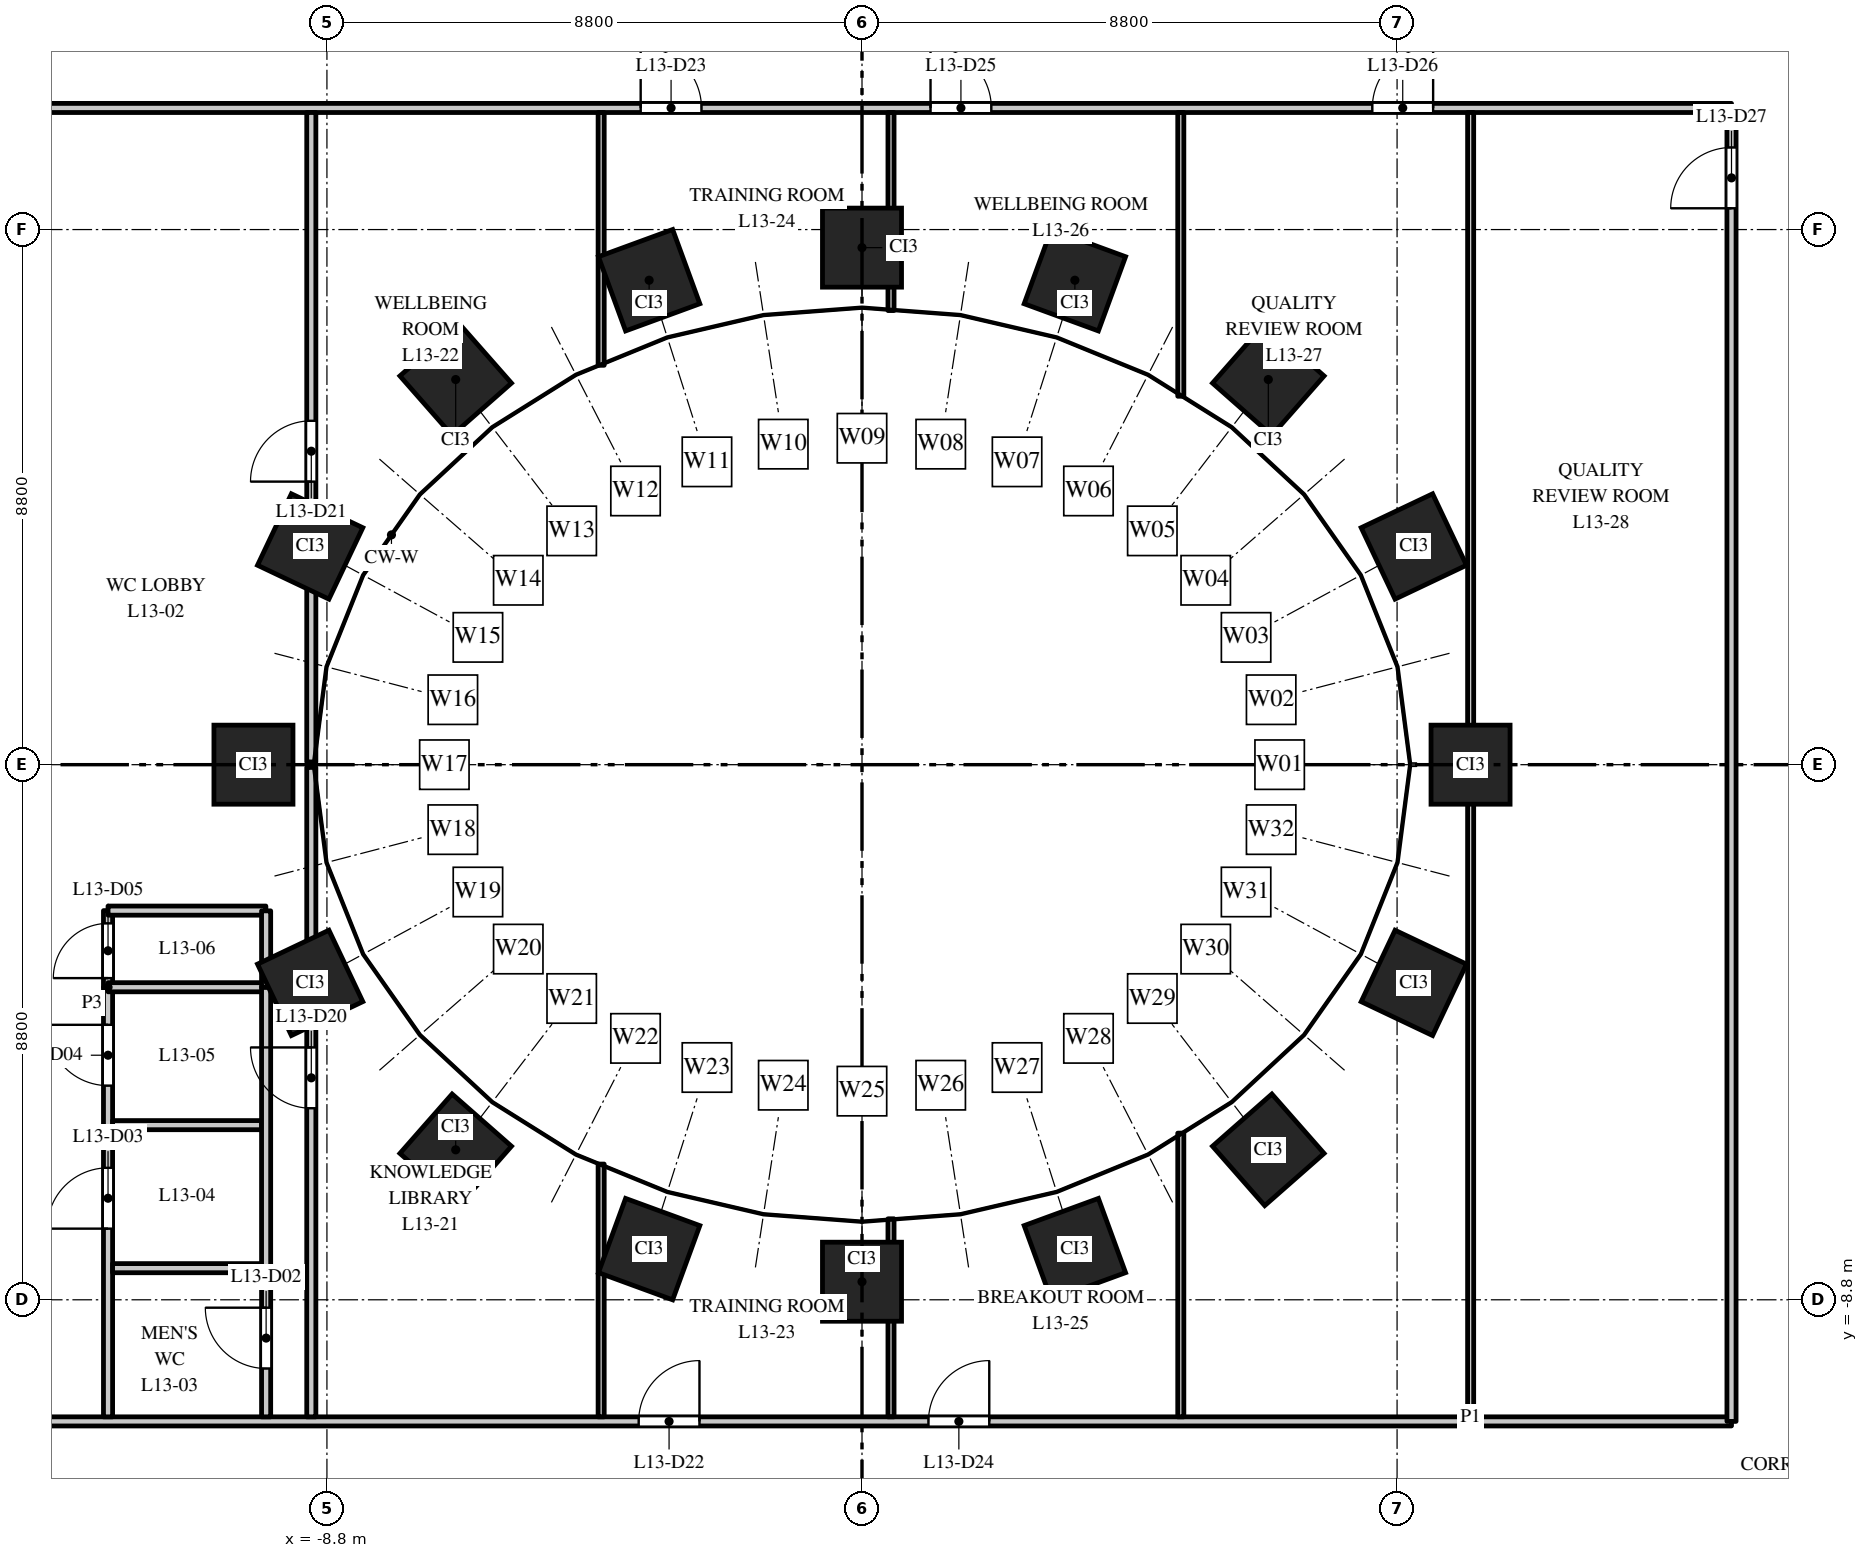
"""IFC4 building model, lengths in metres.
Left out: names, types, materials, properties, quantities, classifications, styles, units other than length and angle.
Written with IfcOpenShell. Run it as: python <this file> out.ifc"""

import sys

from ifc_helpers import new_model, si_unit, direction, frame, frame_2d, origin, origin_2d, place, context, subcontext, project, spatial, rectangle, extrude, element, fill, save


model = new_model("IFC4")
c1 = context("Model", 3, precision=1e-05, world=origin(), true_north=direction((0.0, 1.0)))
c2 = subcontext(c1, "Body", "Model", "MODEL_VIEW")
j1 = project(units=[si_unit("LENGTHUNIT", "METRE"), si_unit("PLANEANGLEUNIT", "RADIAN")], contexts=[c1])
p1 = place(None, origin())
s1 = spatial("IfcSite", under=j1, at=p1, CompositionType="ELEMENT")
p2 = place(p1, origin())
s2 = spatial("IfcBuilding", under=s1, at=p2, CompositionType="ELEMENT")
p3 = place(p2, frame((0.0, 0.0, 62.5)))
s3 = spatial("IfcBuildingStorey", under=s2, at=p3, CompositionType="ELEMENT", Elevation=62.5)
for number, where, z_axis, x_axis in (
    (1, (10.008, 0.0, 0.0), (0.0, 0.0, 1.0), (0.0, 1.0, 0.0)),
    (2, (9.076, 3.588, 0.0), (0.0, 0.0, 1.0), (-0.429, 0.903, 0.0)),
    (3, (6.682, 6.334, 0.0), (0.0, 0.0, 1.0), (-0.751, 0.66, 0.0)),
    (4, (3.501, 7.967, 0.0), (0.0, 0.0, 1.0), (-0.939, 0.344, 0.0)),
    (5, (0.0, 8.503, 0.0), (0.0, 0.0, 1.0), (-1.0, 0.0, 0.0)),
    (6, (-3.501, 7.967, 0.0), (0.0, 0.0, 1.0), (-0.939, -0.344, 0.0)),
    (7, (-6.682, 6.334, 0.0), (0.0, 0.0, 1.0), (-0.751, -0.66, 0.0)),
    (8, (-9.076, 3.588, 0.0), (0.0, 0.0, 1.0), (-0.429, -0.903, 0.0)),
    (9, (-10.008, 0.0, 0.0), (0.0, 0.0, 1.0), (0.0, -1.0, 0.0)),
    (10, (-9.076, -3.588, 0.0), (0.0, 0.0, 1.0), (0.429, -0.903, 0.0)),
    (11, (-6.682, -6.334, 0.0), (0.0, 0.0, 1.0), (0.751, -0.66, 0.0)),
    (12, (-3.501, -7.967, 0.0), (0.0, 0.0, 1.0), (0.939, -0.344, 0.0)),
    (13, (0.0, -8.503, 0.0), (0.0, 0.0, 1.0), (1.0, 0.0, 0.0)),
    (14, (3.501, -7.967, 0.0), (0.0, 0.0, 1.0), (0.939, 0.344, 0.0)),
    (15, (6.682, -6.334, 0.0), (0.0, 0.0, 1.0), (0.751, 0.66, 0.0)),
    (16, (9.076, -3.588, 0.0), (0.0, 0.0, 1.0), (0.429, 0.903, 0.0)),
):
    element("IfcColumn", number, at=place(p3, frame(where, z_axis=z_axis, x_axis=x_axis)), inside=s3, PredefinedType="COLUMN", context=c2, shape_type="SweptSolid", body=[
        extrude(rectangle(XDim=1.3, YDim=1.3, at=origin_2d()), origin(), (0.0, 0.0, 1.0), 4.0),
    ])
p4 = place(p3, frame((-14.3, -10.8, 0.0), z_axis=(0.0, 0.0, 1.0), x_axis=(1.0, 0.0, 0.0)))
e17 = element("IfcWall", 17, at=p4, inside=s3, PredefinedType="PARTITIONING", context=c2, shape_type="SweptSolid", body=[
    extrude(rectangle(XDim=28.6, YDim=0.15, at=frame_2d((14.3, 0.0))), origin(), (0.0, 0.0, 1.0), 2.85),
])
p5 = place(p4, frame((10.627, 0.0, 0.0)))
e18 = element("IfcOpeningElement", 18, at=p5, cuts=e17, PredefinedType="OPENING", context=c2, shape_type="SweptSolid", body=[
    extrude(rectangle(XDim=1.0, YDim=2.1, at=frame_2d((0.5, 1.05))), frame((0.0, 0.085, 0.0), z_axis=(0.0, -1.0, 0.0), x_axis=(1.0, 0.0, 0.0)), (0.0, 0.0, 1.0), 0.17),
])
p6 = place(p4, frame((15.393, 0.0, 0.0)))
e19 = element("IfcOpeningElement", 19, at=p6, cuts=e17, PredefinedType="OPENING", context=c2, shape_type="SweptSolid", body=[
    extrude(rectangle(XDim=1.0, YDim=2.1, at=frame_2d((0.5, 1.05))), frame((0.0, 0.085, 0.0), z_axis=(0.0, -1.0, 0.0), x_axis=(1.0, 0.0, 0.0)), (0.0, 0.0, 1.0), 0.17),
])
p7 = place(p3, frame((-14.3, 10.8, 0.0), z_axis=(0.0, 0.0, 1.0), x_axis=(1.0, 0.0, 0.0)))
e20 = element("IfcWall", 20, at=p7, inside=s3, PredefinedType="PARTITIONING", context=c2, shape_type="SweptSolid", body=[
    extrude(rectangle(XDim=28.6, YDim=0.15, at=frame_2d((14.3, 0.0))), origin(), (0.0, 0.0, 1.0), 2.85),
])
p8 = place(p7, frame((10.66, 0.0, 0.0)))
e21 = element("IfcOpeningElement", 21, at=p8, cuts=e20, PredefinedType="OPENING", context=c2, shape_type="SweptSolid", body=[
    extrude(rectangle(XDim=1.0, YDim=2.1, at=frame_2d((0.5, 1.05))), frame((0.0, 0.085, 0.0), z_axis=(0.0, -1.0, 0.0), x_axis=(1.0, 0.0, 0.0)), (0.0, 0.0, 1.0), 0.17),
])
p9 = place(p7, frame((15.427, 0.0, 0.0)))
e22 = element("IfcOpeningElement", 22, at=p9, cuts=e20, PredefinedType="OPENING", context=c2, shape_type="SweptSolid", body=[
    extrude(rectangle(XDim=1.0, YDim=2.1, at=frame_2d((0.5, 1.05))), frame((0.0, 0.085, 0.0), z_axis=(0.0, -1.0, 0.0), x_axis=(1.0, 0.0, 0.0)), (0.0, 0.0, 1.0), 0.17),
])
p10 = place(p7, frame((22.693, 0.0, 0.0)))
e23 = element("IfcOpeningElement", 23, at=p10, cuts=e20, PredefinedType="OPENING", context=c2, shape_type="SweptSolid", body=[
    extrude(rectangle(XDim=1.0, YDim=2.1, at=frame_2d((0.5, 1.05))), frame((0.0, 0.085, 0.0), z_axis=(0.0, -1.0, 0.0), x_axis=(1.0, 0.0, 0.0)), (0.0, 0.0, 1.0), 0.17),
])
p11 = place(p3, frame((-12.4, -10.725, 0.0), z_axis=(0.0, 0.0, 1.0), x_axis=(0.0, 1.0, 0.0)))
e24 = element("IfcWall", 24, at=p11, inside=s3, PredefinedType="PARTITIONING", context=c2, shape_type="SweptSolid", body=[
    extrude(rectangle(XDim=7.065, YDim=0.15, at=frame_2d((3.533, 0.0))), origin(), (0.0, 0.0, 1.0), 2.75),
])
p12 = place(p11, frame((3.095, 0.0, 0.0)))
e25 = element("IfcOpeningElement", 25, at=p12, cuts=e24, PredefinedType="OPENING", context=c2, shape_type="SweptSolid", body=[
    extrude(rectangle(XDim=1.0, YDim=2.1, at=frame_2d((0.5, 1.05))), frame((0.0, 0.085, 0.0), z_axis=(0.0, -1.0, 0.0), x_axis=(1.0, 0.0, 0.0)), (0.0, 0.0, 1.0), 0.17),
])
p13 = place(p11, frame((5.447, 0.0, 0.0)))
e26 = element("IfcOpeningElement", 26, at=p13, cuts=e24, PredefinedType="OPENING", context=c2, shape_type="SweptSolid", body=[
    extrude(rectangle(XDim=1.0, YDim=2.1, at=frame_2d((0.5, 1.05))), frame((0.0, 0.085, 0.0), z_axis=(0.0, -1.0, 0.0), x_axis=(1.0, 0.0, 0.0)), (0.0, 0.0, 1.0), 0.17),
])
p14 = place(p3, frame((-12.325, -8.28, 0.0), z_axis=(0.0, 0.0, 1.0), x_axis=(1.0, 0.0, 0.0)))
e27 = element("IfcWall", 27, at=p14, inside=s3, PredefinedType="PARTITIONING", context=c2, shape_type="SweptSolid", body=[
    extrude(rectangle(XDim=2.45, YDim=0.15, at=frame_2d((1.225, 0.0))), origin(), (0.0, 0.0, 1.0), 2.75),
])
p15 = place(p3, frame((-12.325, -5.928, 0.0), z_axis=(0.0, 0.0, 1.0), x_axis=(1.0, 0.0, 0.0)))
e28 = element("IfcWall", 28, at=p15, inside=s3, PredefinedType="PARTITIONING", context=c2, shape_type="SweptSolid", body=[
    extrude(rectangle(XDim=2.45, YDim=0.15, at=frame_2d((1.225, 0.0))), origin(), (0.0, 0.0, 1.0), 3.7),
])
p16 = place(p3, frame((-12.4, -3.66, 0.0), z_axis=(0.0, 0.0, 1.0), x_axis=(0.0, 1.0, 0.0)))
e29 = element("IfcWall", 29, at=p16, inside=s3, PredefinedType="PARTITIONING", context=c2, shape_type="SweptSolid", body=[
    extrude(rectangle(XDim=1.26, YDim=0.15, at=frame_2d((0.63, 0.0))), origin(), (0.0, 0.0, 1.0), 3.7),
])
p17 = place(p16, frame((0.15, 0.0, 0.0)))
e30 = element("IfcOpeningElement", 30, at=p17, cuts=e29, PredefinedType="OPENING", context=c2, shape_type="SweptSolid", body=[
    extrude(rectangle(XDim=0.9, YDim=2.1, at=frame_2d((0.45, 1.05))), frame((0.0, 0.085, 0.0), z_axis=(0.0, -1.0, 0.0), x_axis=(1.0, 0.0, 0.0)), (0.0, 0.0, 1.0), 0.17),
])
p18 = place(p3, frame((-12.4, -3.66, 0.0), z_axis=(0.0, 0.0, 1.0), x_axis=(1.0, 0.0, 0.0)))
e31 = element("IfcWall", 31, at=p18, inside=s3, PredefinedType="PARTITIONING", context=c2, shape_type="SweptSolid", body=[
    extrude(rectangle(XDim=2.6, YDim=0.15, at=frame_2d((1.3, 0.0))), origin(), (0.0, 0.0, 1.0), 3.7),
])
p19 = place(p3, frame((-12.4, -2.4, 0.0), z_axis=(0.0, 0.0, 1.0), x_axis=(1.0, 0.0, 0.0)))
e32 = element("IfcWall", 32, at=p19, inside=s3, PredefinedType="PARTITIONING", context=c2, shape_type="SweptSolid", body=[
    extrude(rectangle(XDim=2.596, YDim=0.15, at=frame_2d((1.298, 0.0))), origin(), (0.0, 0.0, 1.0), 3.7),
])
p20 = place(p3, frame((-9.8, -10.725, 0.0), z_axis=(0.0, 0.0, 1.0), x_axis=(0.0, 1.0, 0.0)))
e33 = element("IfcWall", 33, at=p20, inside=s3, PredefinedType="PARTITIONING", context=c2, shape_type="SweptSolid", body=[
    extrude(rectangle(XDim=7.065, YDim=0.15, at=frame_2d((3.533, 0.0))), origin(), (0.0, 0.0, 1.0), 2.75),
])
p21 = place(p20, frame((0.795, 0.0, 0.0)))
e34 = element("IfcOpeningElement", 34, at=p21, cuts=e33, PredefinedType="OPENING", context=c2, shape_type="SweptSolid", body=[
    extrude(rectangle(XDim=1.0, YDim=2.1, at=frame_2d((0.5, 1.05))), frame((0.0, 0.085, 0.0), z_axis=(0.0, -1.0, 0.0), x_axis=(1.0, 0.0, 0.0)), (0.0, 0.0, 1.0), 0.17),
])
p22 = place(p3, frame((-9.8, -3.66, 0.0), z_axis=(0.0, 0.0, 1.0), x_axis=(0.0, 1.0, 0.0)))
e35 = element("IfcWall", 35, at=p22, inside=s3, PredefinedType="PARTITIONING", context=c2, shape_type="SweptSolid", body=[
    extrude(rectangle(XDim=1.256, YDim=0.15, at=frame_2d((0.628, 0.0))), origin(), (0.0, 0.0, 1.0), 3.7),
])
p23 = place(p3, frame((-9.057, -10.725, 0.0), z_axis=(0.0, 0.0, 1.0), x_axis=(0.0, 1.0, 0.0)))
e36 = element("IfcWall", 36, at=p23, inside=s3, PredefinedType="PARTITIONING", context=c2, shape_type="SweptSolid", body=[
    extrude(rectangle(XDim=10.68, YDim=0.15, at=frame_2d((5.34, 0.0))), origin(), (0.0, 0.0, 1.0), 2.75),
])
p24 = place(p23, frame((5.075, 0.0, 0.0)))
e37 = element("IfcOpeningElement", 37, at=p24, cuts=e36, PredefinedType="OPENING", context=c2, shape_type="SweptSolid", body=[
    extrude(rectangle(XDim=1.0, YDim=2.1, at=frame_2d((0.5, 1.05))), frame((0.0, 0.085, 0.0), z_axis=(0.0, -1.0, 0.0), x_axis=(1.0, 0.0, 0.0)), (0.0, 0.0, 1.0), 0.17),
])
p25 = place(p3, frame((-9.057, 0.045, 0.0), z_axis=(0.0, 0.0, 1.0), x_axis=(0.0, 1.0, 0.0)))
e38 = element("IfcWall", 38, at=p25, inside=s3, PredefinedType="PARTITIONING", context=c2, shape_type="SweptSolid", body=[
    extrude(rectangle(XDim=10.68, YDim=0.15, at=frame_2d((5.34, 0.0))), origin(), (0.0, 0.0, 1.0), 2.75),
])
p26 = place(p25, frame((4.61, 0.0, 0.0)))
e39 = element("IfcOpeningElement", 39, at=p26, cuts=e38, PredefinedType="OPENING", context=c2, shape_type="SweptSolid", body=[
    extrude(rectangle(XDim=1.0, YDim=2.1, at=frame_2d((0.5, 1.05))), frame((0.0, 0.085, 0.0), z_axis=(0.0, -1.0, 0.0), x_axis=(1.0, 0.0, 0.0)), (0.0, 0.0, 1.0), 0.17),
])
for number, where, z_axis, x_axis in (
    (40, (-4.29, -10.725, 0.0), (0.0, 0.0, 1.0), (0.0, 1.0, 0.0)),
    (41, (-4.29, 6.568, 0.0), (0.0, 0.0, 1.0), (0.0, 1.0, 0.0)),
):
    element("IfcWall", number, at=place(p3, frame(where, z_axis=z_axis, x_axis=x_axis)), inside=s3, PredefinedType="PARTITIONING", context=c2, shape_type="SweptSolid", body=[
        extrude(rectangle(XDim=4.157, YDim=0.1, at=frame_2d((2.079, 0.0))), origin(), (0.0, 0.0, 1.0), 2.85),
    ])
for number, where, z_axis, x_axis in (
    (42, (0.477, -10.725, 0.0), (0.0, 0.0, 1.0), (0.0, 1.0, 0.0)),
    (43, (0.477, 7.468, 0.0), (0.0, 0.0, 1.0), (0.0, 1.0, 0.0)),
):
    element("IfcWall", number, at=place(p3, frame(where, z_axis=z_axis, x_axis=x_axis)), inside=s3, PredefinedType="PARTITIONING", context=c2, shape_type="SweptSolid", body=[
        extrude(rectangle(XDim=3.257, YDim=0.1, at=frame_2d((1.628, 0.0))), origin(), (0.0, 0.0, 1.0), 2.85),
    ])
for number, where, z_axis, x_axis in (
    (44, (5.243, -10.725, 0.0), (0.0, 0.0, 1.0), (0.0, 1.0, 0.0)),
    (45, (5.243, 6.059, 0.0), (0.0, 0.0, 1.0), (0.0, 1.0, 0.0)),
):
    element("IfcWall", number, at=place(p3, frame(where, z_axis=z_axis, x_axis=x_axis)), inside=s3, PredefinedType="PARTITIONING", context=c2, shape_type="SweptSolid", body=[
        extrude(rectangle(XDim=4.666, YDim=0.1, at=frame_2d((2.333, 0.0))), origin(), (0.0, 0.0, 1.0), 2.85),
    ])
p27 = place(p3, frame((10.01, -10.725, 0.0), z_axis=(0.0, 0.0, 1.0), x_axis=(0.0, 1.0, 0.0)))
e46 = element("IfcWall", 46, at=p27, inside=s3, PredefinedType="PARTITIONING", context=c2, shape_type="SweptSolid", body=[
    extrude(rectangle(XDim=21.45, YDim=0.1, at=frame_2d((10.725, 0.0))), origin(), (0.0, 0.0, 1.0), 2.75),
])
p28 = place(p3, frame((14.3, -10.8, 0.0), z_axis=(0.0, 0.0, 1.0), x_axis=(0.0, 1.0, 0.0)))
e47 = element("IfcWall", 47, at=p28, inside=s3, PredefinedType="PARTITIONING", context=c2, shape_type="SweptSolid", body=[
    extrude(rectangle(XDim=21.6, YDim=0.15, at=frame_2d((10.8, 0.0))), origin(), (0.0, 0.0, 1.0), 2.75),
])
p29 = place(p28, frame((19.95, 0.0, 0.0)))
e48 = element("IfcOpeningElement", 48, at=p29, cuts=e47, PredefinedType="OPENING", context=c2, shape_type="SweptSolid", body=[
    extrude(rectangle(XDim=1.0, YDim=2.1, at=frame_2d((0.5, 1.05))), frame((0.0, 0.085, 0.0), z_axis=(0.0, -1.0, 0.0), x_axis=(1.0, 0.0, 0.0)), (0.0, 0.0, 1.0), 0.17),
])
p30 = place(p21, origin())
e49 = element("IfcDoor", 49, at=p30, inside=s3, OperationType="SINGLE_SWING_RIGHT", PredefinedType="DOOR", context=c2, shape_type="SweptSolid", body=[
    extrude(rectangle(XDim=1.0, YDim=2.1, at=frame_2d((0.5, 1.05))), frame((0.0, 0.025, 0.0), z_axis=(0.0, -1.0, 0.0), x_axis=(1.0, 0.0, 0.0)), (0.0, 0.0, 1.0), 0.05),
])
fill(e34, e49)
p31 = place(p12, origin())
e50 = element("IfcDoor", 50, at=p31, inside=s3, OperationType="SINGLE_SWING_LEFT", PredefinedType="DOOR", context=c2, shape_type="SweptSolid", body=[
    extrude(rectangle(XDim=1.0, YDim=2.1, at=frame_2d((0.5, 1.05))), frame((0.0, 0.025, 0.0), z_axis=(0.0, -1.0, 0.0), x_axis=(1.0, 0.0, 0.0)), (0.0, 0.0, 1.0), 0.05),
])
fill(e25, e50)
p32 = place(p13, origin())
e51 = element("IfcDoor", 51, at=p32, inside=s3, OperationType="SINGLE_SWING_RIGHT", PredefinedType="DOOR", context=c2, shape_type="SweptSolid", body=[
    extrude(rectangle(XDim=1.0, YDim=2.1, at=frame_2d((0.5, 1.05))), frame((0.0, 0.025, 0.0), z_axis=(0.0, -1.0, 0.0), x_axis=(1.0, 0.0, 0.0)), (0.0, 0.0, 1.0), 0.05),
])
fill(e26, e51)
p33 = place(p17, origin())
e52 = element("IfcDoor", 52, at=p33, inside=s3, OperationType="SINGLE_SWING_LEFT", PredefinedType="DOOR", context=c2, shape_type="SweptSolid", body=[
    extrude(rectangle(XDim=0.9, YDim=2.1, at=frame_2d((0.45, 1.05))), frame((0.0, 0.025, 0.0), z_axis=(0.0, -1.0, 0.0), x_axis=(1.0, 0.0, 0.0)), (0.0, 0.0, 1.0), 0.05),
])
fill(e30, e52)
p34 = place(p24, origin())
e53 = element("IfcDoor", 53, at=p34, inside=s3, OperationType="SINGLE_SWING_RIGHT", PredefinedType="DOOR", context=c2, shape_type="SweptSolid", body=[
    extrude(rectangle(XDim=1.0, YDim=2.1, at=frame_2d((0.5, 1.05))), frame((0.0, 0.025, 0.0), z_axis=(0.0, -1.0, 0.0), x_axis=(1.0, 0.0, 0.0)), (0.0, 0.0, 1.0), 0.05),
])
fill(e37, e53)
p35 = place(p26, origin())
e54 = element("IfcDoor", 54, at=p35, inside=s3, OperationType="SINGLE_SWING_LEFT", PredefinedType="DOOR", context=c2, shape_type="SweptSolid", body=[
    extrude(rectangle(XDim=1.0, YDim=2.1, at=frame_2d((0.5, 1.05))), frame((0.0, 0.025, 0.0), z_axis=(0.0, -1.0, 0.0), x_axis=(1.0, 0.0, 0.0)), (0.0, 0.0, 1.0), 0.05),
])
fill(e39, e54)
p36 = place(p5, origin())
e55 = element("IfcDoor", 55, at=p36, inside=s3, OperationType="SINGLE_SWING_RIGHT", PredefinedType="DOOR", context=c2, shape_type="SweptSolid", body=[
    extrude(rectangle(XDim=1.0, YDim=2.1, at=frame_2d((0.5, 1.05))), frame((0.0, 0.025, 0.0), z_axis=(0.0, -1.0, 0.0), x_axis=(1.0, 0.0, 0.0)), (0.0, 0.0, 1.0), 0.05),
])
fill(e18, e55)
p37 = place(p8, origin())
e56 = element("IfcDoor", 56, at=p37, inside=s3, OperationType="SINGLE_SWING_LEFT", PredefinedType="DOOR", context=c2, shape_type="SweptSolid", body=[
    extrude(rectangle(XDim=1.0, YDim=2.1, at=frame_2d((0.5, 1.05))), frame((0.0, 0.025, 0.0), z_axis=(0.0, -1.0, 0.0), x_axis=(1.0, 0.0, 0.0)), (0.0, 0.0, 1.0), 0.05),
])
fill(e21, e56)
p38 = place(p6, origin())
e57 = element("IfcDoor", 57, at=p38, inside=s3, OperationType="SINGLE_SWING_RIGHT", PredefinedType="DOOR", context=c2, shape_type="SweptSolid", body=[
    extrude(rectangle(XDim=1.0, YDim=2.1, at=frame_2d((0.5, 1.05))), frame((0.0, 0.025, 0.0), z_axis=(0.0, -1.0, 0.0), x_axis=(1.0, 0.0, 0.0)), (0.0, 0.0, 1.0), 0.05),
])
fill(e19, e57)
p39 = place(p9, origin())
e58 = element("IfcDoor", 58, at=p39, inside=s3, OperationType="SINGLE_SWING_LEFT", PredefinedType="DOOR", context=c2, shape_type="SweptSolid", body=[
    extrude(rectangle(XDim=1.0, YDim=2.1, at=frame_2d((0.5, 1.05))), frame((0.0, 0.025, 0.0), z_axis=(0.0, -1.0, 0.0), x_axis=(1.0, 0.0, 0.0)), (0.0, 0.0, 1.0), 0.05),
])
fill(e22, e58)
p40 = place(p10, origin())
e59 = element("IfcDoor", 59, at=p40, inside=s3, OperationType="SINGLE_SWING_RIGHT", PredefinedType="DOOR", context=c2, shape_type="SweptSolid", body=[
    extrude(rectangle(XDim=1.0, YDim=2.1, at=frame_2d((0.5, 1.05))), frame((0.0, 0.025, 0.0), z_axis=(0.0, -1.0, 0.0), x_axis=(1.0, 0.0, 0.0)), (0.0, 0.0, 1.0), 0.05),
])
fill(e23, e59)
p41 = place(p29, origin())
e60 = element("IfcDoor", 60, at=p41, inside=s3, OperationType="SINGLE_SWING_LEFT", PredefinedType="DOOR", context=c2, shape_type="SweptSolid", body=[
    extrude(rectangle(XDim=1.0, YDim=2.1, at=frame_2d((0.5, 1.05))), frame((0.0, 0.025, 0.0), z_axis=(0.0, -1.0, 0.0), x_axis=(1.0, 0.0, 0.0)), (0.0, 0.0, 1.0), 0.05),
])
fill(e48, e60)
save(model, sys.argv[1])
